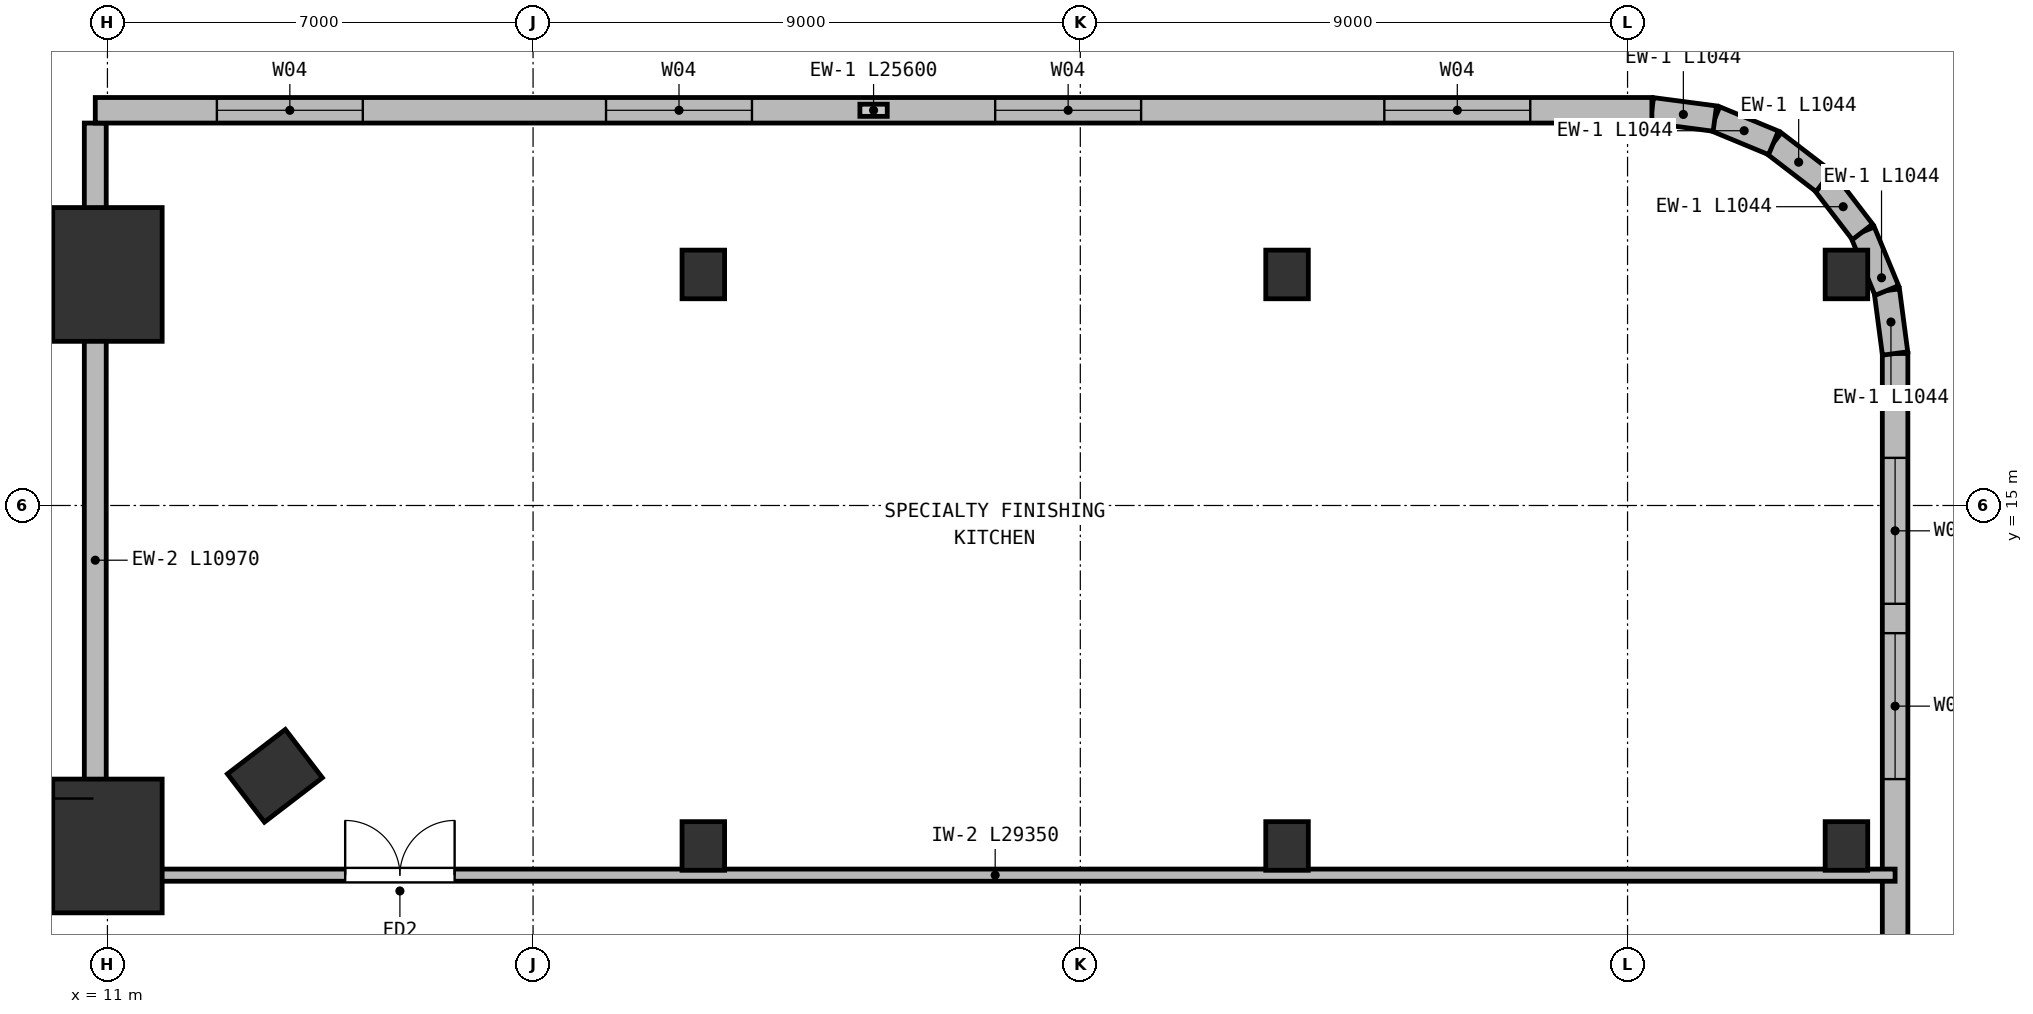
"""IFC4 building model, lengths in metres.
Left out: names, types, materials, properties, quantities, classifications, styles, units other than length and angle.
Written with IfcOpenShell. Run it as: python <this file> out.ifc"""

import sys

from ifc_helpers import new_model, si_unit, direction, frame, frame_2d, origin, origin_2d, place, context, subcontext, project, spatial, rectangle, extrude, element, fill, save


model = new_model("IFC4")
c1 = context("Model", 3, precision=1e-05, world=origin(), true_north=direction((0.0, 1.0)))
c2 = subcontext(c1, "Body", "Model", "MODEL_VIEW")
j1 = project(units=[si_unit("LENGTHUNIT", "METRE"), si_unit("PLANEANGLEUNIT", "RADIAN")], contexts=[c1])
p1 = place(None, origin())
s1 = spatial("IfcSite", under=j1, at=p1, CompositionType="ELEMENT")
p2 = place(p1, origin())
s2 = spatial("IfcBuilding", under=s1, at=p2, CompositionType="ELEMENT")
p3 = place(p2, frame((0.0, 0.0, 11.0)))
s3 = spatial("IfcBuildingStorey", under=s2, at=p3, CompositionType="ELEMENT", Elevation=11.0)
p4 = place(p3, frame((13.754, 10.554, 0.0), z_axis=(0.0, 0.0, 1.0), x_axis=(-0.608761429009, 0.793353340291, 0.0)))
e1 = element("IfcColumn", 1, at=p4, inside=s3, PredefinedType="COLUMN", context=c2, shape_type="SweptSolid", body=[
    extrude(rectangle(XDim=1.0, YDim=1.2, at=origin_2d()), origin(), (0.0, 0.0, 1.0), 5.0),
])
for number, where, z_axis, x_axis in (
    (2, (11.0, 9.4, 0.0), (0.0, 0.0, 1.0), (1.0, 0.0, 0.0)),
    (3, (11.0, 18.8, 0.0), (0.0, 0.0, 1.0), (1.0, 0.0, 0.0)),
):
    element("IfcColumn", number, at=place(p3, frame(where, z_axis=z_axis, x_axis=x_axis)), inside=s3, PredefinedType="COLUMN", context=c2, shape_type="SweptSolid", body=[
        extrude(rectangle(XDim=1.8, YDim=2.2, at=origin_2d()), origin(), (0.0, 0.0, 1.0), 5.0),
    ])
for number, where, z_axis, x_axis in (
    (4, (20.8, 9.4, 0.0), (0.0, 0.0, 1.0), (1.0, 0.0, 0.0)),
    (5, (20.8, 18.8, 0.0), (0.0, 0.0, 1.0), (1.0, 0.0, 0.0)),
    (6, (30.4, 9.4, 0.0), (0.0, 0.0, 1.0), (1.0, 0.0, 0.0)),
    (7, (30.4, 18.8, 0.0), (0.0, 0.0, 1.0), (1.0, 0.0, 0.0)),
    (8, (39.6, 9.4, 0.0), (0.0, 0.0, 1.0), (1.0, 0.0, 0.0)),
    (9, (39.6, 18.8, 0.0), (0.0, 0.0, 1.0), (1.0, 0.0, 0.0)),
):
    element("IfcColumn", number, at=place(p3, frame(where, z_axis=z_axis, x_axis=x_axis)), inside=s3, PredefinedType="COLUMN", context=c2, shape_type="SweptSolid", body=[
        extrude(rectangle(XDim=0.7, YDim=0.8, at=origin_2d()), origin(), (0.0, 0.0, 1.0), 5.0),
    ])
p5 = place(p3, frame((10.8, 21.29, 0.0), z_axis=(0.0, 0.0, 1.0), x_axis=(0.0, -1.0, 0.0)))
e10 = element("IfcWall", 10, at=p5, inside=s3, PredefinedType="SOLIDWALL", context=c2, shape_type="SweptSolid", body=[
    extrude(rectangle(XDim=10.97, YDim=0.36, at=frame_2d((5.485, 0.0))), origin(), (0.0, 0.0, 1.0), 2.84),
])
p6 = place(p3, frame((40.4, 17.5, 0.0), z_axis=(0.0, 0.0, 1.0), x_axis=(0.0, -1.0, 0.0)))
e11 = element("IfcWall", 11, at=p6, inside=s3, PredefinedType="SOLIDWALL", context=c2, shape_type="SweptSolid", body=[
    extrude(rectangle(XDim=35.0, YDim=0.42, at=frame_2d((17.5, 0.0))), origin(), (0.0, 0.0, 1.0), 4.66),
])
p7 = place(p6, frame((1.717, 0.0, 0.95)))
e12 = element("IfcOpeningElement", 12, at=p7, cuts=e11, PredefinedType="OPENING", context=c2, shape_type="SweptSolid", body=[
    extrude(rectangle(XDim=2.4, YDim=2.6, at=frame_2d((1.2, 1.3))), frame((0.0, 0.22, 0.0), z_axis=(0.0, -1.0, 0.0), x_axis=(1.0, 0.0, 0.0)), (0.0, 0.0, 1.0), 0.44),
])
p8 = place(p6, frame((4.6, 0.0, 0.95)))
e13 = element("IfcOpeningElement", 13, at=p8, cuts=e11, PredefinedType="OPENING", context=c2, shape_type="SweptSolid", body=[
    extrude(rectangle(XDim=2.4, YDim=2.6, at=frame_2d((1.2, 1.3))), frame((0.0, 0.22, 0.0), z_axis=(0.0, -1.0, 0.0), x_axis=(1.0, 0.0, 0.0)), (0.0, 0.0, 1.0), 0.44),
])
p9 = place(p6, frame((13.383, 0.0, 0.95)))
e14 = element("IfcOpeningElement", 14, at=p9, cuts=e11, PredefinedType="OPENING", context=c2, shape_type="SweptSolid", body=[
    extrude(rectangle(XDim=2.4, YDim=2.6, at=frame_2d((1.2, 1.3))), frame((0.0, 0.22, 0.0), z_axis=(0.0, -1.0, 0.0), x_axis=(1.0, 0.0, 0.0)), (0.0, 0.0, 1.0), 0.44),
])
p10 = place(p6, frame((19.217, 0.0, 0.95)))
e15 = element("IfcOpeningElement", 15, at=p10, cuts=e11, PredefinedType="OPENING", context=c2, shape_type="SweptSolid", body=[
    extrude(rectangle(XDim=2.4, YDim=2.6, at=frame_2d((1.2, 1.3))), frame((0.0, 0.22, 0.0), z_axis=(0.0, -1.0, 0.0), x_axis=(1.0, 0.0, 0.0)), (0.0, 0.0, 1.0), 0.44),
])
p11 = place(p6, frame((28.0, 0.0, 0.95)))
e16 = element("IfcOpeningElement", 16, at=p11, cuts=e11, PredefinedType="OPENING", context=c2, shape_type="SweptSolid", body=[
    extrude(rectangle(XDim=2.4, YDim=2.6, at=frame_2d((1.2, 1.3))), frame((0.0, 0.22, 0.0), z_axis=(0.0, -1.0, 0.0), x_axis=(1.0, 0.0, 0.0)), (0.0, 0.0, 1.0), 0.44),
])
p12 = place(p6, frame((30.883, 0.0, 0.95)))
e17 = element("IfcOpeningElement", 17, at=p12, cuts=e11, PredefinedType="OPENING", context=c2, shape_type="SweptSolid", body=[
    extrude(rectangle(XDim=2.4, YDim=2.6, at=frame_2d((1.2, 1.3))), frame((0.0, 0.22, 0.0), z_axis=(0.0, -1.0, 0.0), x_axis=(1.0, 0.0, 0.0)), (0.0, 0.0, 1.0), 0.44),
])
p13 = place(p3, frame((40.264, 18.535, 0.0), z_axis=(0.0, 0.0, 1.0), x_axis=(0.130448465198, -0.991455091231, 0.0)))
e18 = element("IfcWall", 18, at=p13, inside=s3, PredefinedType="SOLIDWALL", context=c2, shape_type="SweptSolid", body=[
    extrude(rectangle(XDim=1.044, YDim=0.42, at=frame_2d((0.522, 0.0))), origin(), (0.0, 0.0, 1.0), 4.66),
])
p14 = place(p3, frame((39.864, 19.5, 0.0), z_axis=(0.0, 0.0, 1.0), x_axis=(0.382771688877, -0.923842970528, 0.0)))
e19 = element("IfcWall", 19, at=p14, inside=s3, PredefinedType="SOLIDWALL", context=c2, shape_type="SweptSolid", body=[
    extrude(rectangle(XDim=1.044, YDim=0.42, at=frame_2d((0.522, 0.0))), origin(), (0.0, 0.0, 1.0), 4.66),
])
p15 = place(p3, frame((39.229, 20.328, 0.0), z_axis=(0.0, 0.0, 1.0), x_axis=(0.608681879412, -0.793414374508, 0.0)))
e20 = element("IfcWall", 20, at=p15, inside=s3, PredefinedType="SOLIDWALL", context=c2, shape_type="SweptSolid", body=[
    extrude(rectangle(XDim=1.044, YDim=0.42, at=frame_2d((0.522, 0.0))), origin(), (0.0, 0.0, 1.0), 4.66),
])
p16 = place(p3, frame((38.4, 20.964, 0.0), z_axis=(0.0, 0.0, 1.0), x_axis=(0.793388088797, -0.608716141198, 0.0)))
e21 = element("IfcWall", 21, at=p16, inside=s3, PredefinedType="SOLIDWALL", context=c2, shape_type="SweptSolid", body=[
    extrude(rectangle(XDim=1.044, YDim=0.42, at=frame_2d((0.522, 0.0))), origin(), (0.0, 0.0, 1.0), 4.66),
])
p17 = place(p3, frame((37.435, 21.364, 0.0), z_axis=(0.0, 0.0, 1.0), x_axis=(0.923842970528, -0.382771688877, 0.0)))
e22 = element("IfcWall", 22, at=p17, inside=s3, PredefinedType="SOLIDWALL", context=c2, shape_type="SweptSolid", body=[
    extrude(rectangle(XDim=1.044, YDim=0.42, at=frame_2d((0.522, 0.0))), origin(), (0.0, 0.0, 1.0), 4.66),
])
p18 = place(p3, frame((36.4, 21.5, 0.0), z_axis=(0.0, 0.0, 1.0), x_axis=(0.991455091231, -0.130448465198, 0.0)))
e23 = element("IfcWall", 23, at=p18, inside=s3, PredefinedType="SOLIDWALL", context=c2, shape_type="SweptSolid", body=[
    extrude(rectangle(XDim=1.044, YDim=0.42, at=frame_2d((0.522, 0.0))), origin(), (0.0, 0.0, 1.0), 4.66),
])
p19 = place(p3, frame((10.8, 21.5, 0.0), z_axis=(0.0, 0.0, 1.0), x_axis=(1.0, 0.0, 0.0)))
e24 = element("IfcWall", 24, at=p19, inside=s3, PredefinedType="SOLIDWALL", context=c2, shape_type="SweptSolid", body=[
    extrude(rectangle(XDim=25.6, YDim=0.42, at=frame_2d((12.8, 0.0))), origin(), (0.0, 0.0, 1.0), 4.66),
])
p20 = place(p19, frame((2.0, 0.0, 0.95)))
e25 = element("IfcOpeningElement", 25, at=p20, cuts=e24, PredefinedType="OPENING", context=c2, shape_type="SweptSolid", body=[
    extrude(rectangle(XDim=2.4, YDim=2.6, at=frame_2d((1.2, 1.3))), frame((0.0, 0.22, 0.0), z_axis=(0.0, -1.0, 0.0), x_axis=(1.0, 0.0, 0.0)), (0.0, 0.0, 1.0), 0.44),
])
p21 = place(p19, frame((8.4, 0.0, 0.95)))
e26 = element("IfcOpeningElement", 26, at=p21, cuts=e24, PredefinedType="OPENING", context=c2, shape_type="SweptSolid", body=[
    extrude(rectangle(XDim=2.4, YDim=2.6, at=frame_2d((1.2, 1.3))), frame((0.0, 0.22, 0.0), z_axis=(0.0, -1.0, 0.0), x_axis=(1.0, 0.0, 0.0)), (0.0, 0.0, 1.0), 0.44),
])
p22 = place(p19, frame((14.8, 0.0, 0.95)))
e27 = element("IfcOpeningElement", 27, at=p22, cuts=e24, PredefinedType="OPENING", context=c2, shape_type="SweptSolid", body=[
    extrude(rectangle(XDim=2.4, YDim=2.6, at=frame_2d((1.2, 1.3))), frame((0.0, 0.22, 0.0), z_axis=(0.0, -1.0, 0.0), x_axis=(1.0, 0.0, 0.0)), (0.0, 0.0, 1.0), 0.44),
])
p23 = place(p19, frame((21.2, 0.0, 0.95)))
e28 = element("IfcOpeningElement", 28, at=p23, cuts=e24, PredefinedType="OPENING", context=c2, shape_type="SweptSolid", body=[
    extrude(rectangle(XDim=2.4, YDim=2.6, at=frame_2d((1.2, 1.3))), frame((0.0, 0.22, 0.0), z_axis=(0.0, -1.0, 0.0), x_axis=(1.0, 0.0, 0.0)), (0.0, 0.0, 1.0), 0.44),
])
p24 = place(p3, frame((11.05, 8.92, 0.0), z_axis=(0.0, 0.0, 1.0), x_axis=(1.0, 0.0, 0.0)))
e29 = element("IfcWall", 29, at=p24, inside=s3, PredefinedType="PARTITIONING", context=c2, shape_type="SweptSolid", body=[
    extrude(rectangle(XDim=29.35, YDim=0.2, at=frame_2d((14.675, 0.0))), origin(), (0.0, 0.0, 1.0), 4.66),
])
p25 = place(p24, frame((3.86, 0.0, 0.0)))
e30 = element("IfcOpeningElement", 30, at=p25, cuts=e29, PredefinedType="OPENING", context=c2, shape_type="SweptSolid", body=[
    extrude(rectangle(XDim=1.8, YDim=2.2, at=frame_2d((0.9, 1.1))), frame((0.0, 0.11, 0.0), z_axis=(0.0, -1.0, 0.0), x_axis=(1.0, 0.0, 0.0)), (0.0, 0.0, 1.0), 0.22),
])
p26 = place(p7, origin())
e31 = element("IfcWindow", 31, at=p26, inside=s3, PartitioningType="SINGLE_PANEL", PredefinedType="WINDOW", context=c2, shape_type="SweptSolid", body=[
    extrude(rectangle(XDim=2.4, YDim=2.6, at=frame_2d((1.2, 1.3))), frame((0.0, 0.03, 0.0), z_axis=(0.0, -1.0, 0.0), x_axis=(1.0, 0.0, 0.0)), (0.0, 0.0, 1.0), 0.06),
])
fill(e12, e31)
p27 = place(p8, origin())
e32 = element("IfcWindow", 32, at=p27, inside=s3, PartitioningType="SINGLE_PANEL", PredefinedType="WINDOW", context=c2, shape_type="SweptSolid", body=[
    extrude(rectangle(XDim=2.4, YDim=2.6, at=frame_2d((1.2, 1.3))), frame((0.0, 0.03, 0.0), z_axis=(0.0, -1.0, 0.0), x_axis=(1.0, 0.0, 0.0)), (0.0, 0.0, 1.0), 0.06),
])
fill(e13, e32)
p28 = place(p20, origin())
e33 = element("IfcWindow", 33, at=p28, inside=s3, PartitioningType="SINGLE_PANEL", PredefinedType="WINDOW", context=c2, shape_type="SweptSolid", body=[
    extrude(rectangle(XDim=2.4, YDim=2.6, at=frame_2d((1.2, 1.3))), frame((0.0, 0.03, 0.0), z_axis=(0.0, -1.0, 0.0), x_axis=(1.0, 0.0, 0.0)), (0.0, 0.0, 1.0), 0.06),
])
fill(e25, e33)
p29 = place(p21, origin())
e34 = element("IfcWindow", 34, at=p29, inside=s3, PartitioningType="SINGLE_PANEL", PredefinedType="WINDOW", context=c2, shape_type="SweptSolid", body=[
    extrude(rectangle(XDim=2.4, YDim=2.6, at=frame_2d((1.2, 1.3))), frame((0.0, 0.03, 0.0), z_axis=(0.0, -1.0, 0.0), x_axis=(1.0, 0.0, 0.0)), (0.0, 0.0, 1.0), 0.06),
])
fill(e26, e34)
p30 = place(p22, origin())
e35 = element("IfcWindow", 35, at=p30, inside=s3, PartitioningType="SINGLE_PANEL", PredefinedType="WINDOW", context=c2, shape_type="SweptSolid", body=[
    extrude(rectangle(XDim=2.4, YDim=2.6, at=frame_2d((1.2, 1.3))), frame((0.0, 0.03, 0.0), z_axis=(0.0, -1.0, 0.0), x_axis=(1.0, 0.0, 0.0)), (0.0, 0.0, 1.0), 0.06),
])
fill(e27, e35)
p31 = place(p23, origin())
e36 = element("IfcWindow", 36, at=p31, inside=s3, PartitioningType="SINGLE_PANEL", PredefinedType="WINDOW", context=c2, shape_type="SweptSolid", body=[
    extrude(rectangle(XDim=2.4, YDim=2.6, at=frame_2d((1.2, 1.3))), frame((0.0, 0.03, 0.0), z_axis=(0.0, -1.0, 0.0), x_axis=(1.0, 0.0, 0.0)), (0.0, 0.0, 1.0), 0.06),
])
fill(e28, e36)
p32 = place(p25, origin())
e37 = element("IfcDoor", 37, at=p32, inside=s3, OperationType="DOUBLE_DOOR_SINGLE_SWING", PredefinedType="DOOR", context=c2, shape_type="SweptSolid", body=[
    extrude(rectangle(XDim=1.8, YDim=2.2, at=frame_2d((0.9, 1.1))), frame((0.0, 0.025, 0.0), z_axis=(0.0, -1.0, 0.0), x_axis=(1.0, 0.0, 0.0)), (0.0, 0.0, 1.0), 0.05),
])
fill(e30, e37)
save(model, sys.argv[1])
